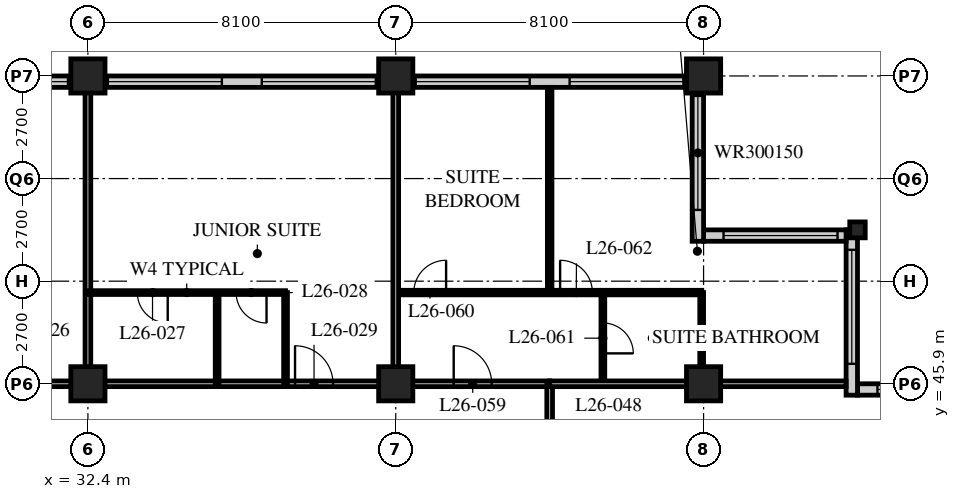
"""IFC4 building model, lengths in metres.
Left out: names, types, materials, properties, quantities, classifications, styles, units other than length and angle.
Written with IfcOpenShell. Run it as: python <this file> out.ifc"""

import sys

from ifc_helpers import new_model, si_unit, direction, frame, frame_2d, origin, origin_2d, place, context, subcontext, project, spatial, rectangle, hollow_rectangle, i_section, extrude, element, fill, save


model = new_model("IFC4")
c1 = context("Model", 3, precision=1e-05, world=origin(), true_north=direction((0.0, 1.0)))
c2 = subcontext(c1, "Body", "Model", "MODEL_VIEW")
j1 = project(units=[si_unit("LENGTHUNIT", "METRE"), si_unit("PLANEANGLEUNIT", "RADIAN")], contexts=[c1])
p1 = place(None, origin())
s1 = spatial("IfcSite", under=j1, at=p1, CompositionType="ELEMENT")
p2 = place(p1, origin())
s2 = spatial("IfcBuilding", under=s1, at=p2, CompositionType="ELEMENT")
p3 = place(p2, frame((0.0, 0.0, 106.8)))
s3 = spatial("IfcBuildingStorey", under=s2, at=p3, CompositionType="ELEMENT", Elevation=106.8)
for number, where, z_axis, x_axis in (
    (1, (32.4, 45.9, 0.0), (0.0, 0.0, 1.0), (1.0, 0.0, 0.0)),
    (2, (32.4, 54.0, 0.0), (0.0, 0.0, 1.0), (1.0, 0.0, 0.0)),
    (3, (40.5, 45.9, 0.0), (0.0, 0.0, 1.0), (1.0, 0.0, 0.0)),
    (4, (40.5, 54.0, 0.0), (0.0, 0.0, 1.0), (1.0, 0.0, 0.0)),
    (5, (48.6, 45.9, 0.0), (0.0, 0.0, 1.0), (1.0, 0.0, 0.0)),
    (6, (48.6, 54.0, 0.0), (0.0, 0.0, 1.0), (1.0, 0.0, 0.0)),
):
    element("IfcColumn", number, at=place(p3, frame(where, z_axis=z_axis, x_axis=x_axis)), inside=s3, PredefinedType="COLUMN", context=c2, shape_type="SweptSolid", body=[
        extrude(hollow_rectangle(XDim=0.9, YDim=0.9, WallThickness=0.09, at=origin_2d()), origin(), (0.0, 0.0, 1.0), 3.4),
    ])
p4 = place(p3, frame((52.65, 49.95, 0.0), z_axis=(0.0, 0.0, 1.0), x_axis=(1.0, 0.0, 0.0)))
e7 = element("IfcColumn", 7, at=p4, inside=s3, PredefinedType="COLUMN", context=c2, shape_type="SweptSolid", body=[
    extrude(i_section(OverallWidth=0.407, OverallDepth=0.419, WebThickness=0.031, FlangeThickness=0.049, FilletRadius=0.015, at=origin_2d()), origin(), (0.0, 0.0, 1.0), 3.4),
])
p5 = place(p3, frame((56.4, 45.75, 0.0), z_axis=(0.0, 0.0, 1.0), x_axis=(-1.0, 0.0, 0.0)))
e8 = element("IfcWall", 8, at=p5, inside=s3, PredefinedType="SOLIDWALL", context=c2, shape_type="SweptSolid", body=[
    extrude(rectangle(XDim=3.75, YDim=0.3, at=frame_2d((1.875, 0.0))), origin(), (0.0, 0.0, 1.0), 3.19),
])
p6 = place(p5, frame((0.225, 0.0, 0.9)))
e9 = element("IfcOpeningElement", 9, at=p6, cuts=e8, PredefinedType="OPENING", context=c2, shape_type="SweptSolid", body=[
    extrude(rectangle(XDim=3.0, YDim=1.5, at=frame_2d((1.5, 0.75))), frame((0.0, 0.16, 0.0), z_axis=(0.0, -1.0, 0.0), x_axis=(1.0, 0.0, 0.0)), (0.0, 0.0, 1.0), 0.32),
])
p7 = place(p3, frame((52.5, 45.6, 0.0), z_axis=(0.0, 0.0, 1.0), x_axis=(0.0, 1.0, 0.0)))
e10 = element("IfcWall", 10, at=p7, inside=s3, PredefinedType="SOLIDWALL", context=c2, shape_type="SweptSolid", body=[
    extrude(rectangle(XDim=4.35, YDim=0.3, at=frame_2d((2.175, 0.0))), origin(), (0.0, 0.0, 1.0), 3.19),
])
p8 = place(p7, frame((0.825, 0.0, 0.9)))
e11 = element("IfcOpeningElement", 11, at=p8, cuts=e10, PredefinedType="OPENING", context=c2, shape_type="SweptSolid", body=[
    extrude(rectangle(XDim=3.0, YDim=1.5, at=frame_2d((1.5, 0.75))), frame((0.0, 0.16, 0.0), z_axis=(0.0, -1.0, 0.0), x_axis=(1.0, 0.0, 0.0)), (0.0, 0.0, 1.0), 0.32),
])
p9 = place(p3, frame((52.35, 49.8, 0.0), z_axis=(0.0, 0.0, 1.0), x_axis=(-1.0, 0.0, 0.0)))
e12 = element("IfcWall", 12, at=p9, inside=s3, PredefinedType="SOLIDWALL", context=c2, shape_type="SweptSolid", body=[
    extrude(rectangle(XDim=3.75, YDim=0.3, at=frame_2d((1.875, 0.0))), origin(), (0.0, 0.0, 1.0), 3.19),
])
p10 = place(p9, frame((0.225, 0.0, 0.9)))
e13 = element("IfcOpeningElement", 13, at=p10, cuts=e12, PredefinedType="OPENING", context=c2, shape_type="SweptSolid", body=[
    extrude(rectangle(XDim=3.0, YDim=1.5, at=frame_2d((1.5, 0.75))), frame((0.0, 0.16, 0.0), z_axis=(0.0, -1.0, 0.0), x_axis=(1.0, 0.0, 0.0)), (0.0, 0.0, 1.0), 0.32),
])
p11 = place(p3, frame((48.45, 49.65, 0.0), z_axis=(0.0, 0.0, 1.0), x_axis=(0.0, 1.0, 0.0)))
e14 = element("IfcWall", 14, at=p11, inside=s3, PredefinedType="SOLIDWALL", context=c2, shape_type="SweptSolid", body=[
    extrude(rectangle(XDim=4.35, YDim=0.3, at=frame_2d((2.175, 0.0))), origin(), (0.0, 0.0, 1.0), 3.19),
])
p12 = place(p11, frame((0.825, 0.0, 0.9)))
e15 = element("IfcOpeningElement", 15, at=p12, cuts=e14, PredefinedType="OPENING", context=c2, shape_type="SweptSolid", body=[
    extrude(rectangle(XDim=3.0, YDim=1.5, at=frame_2d((1.5, 0.75))), frame((0.0, 0.16, 0.0), z_axis=(0.0, -1.0, 0.0), x_axis=(1.0, 0.0, 0.0)), (0.0, 0.0, 1.0), 0.32),
])
p13 = place(p3, frame((48.3, 53.85, 0.0), z_axis=(0.0, 0.0, 1.0), x_axis=(-1.0, 0.0, 0.0)))
e16 = element("IfcWall", 16, at=p13, inside=s3, PredefinedType="SOLIDWALL", context=c2, shape_type="SweptSolid", body=[
    extrude(rectangle(XDim=40.2, YDim=0.3, at=frame_2d((20.1, 0.0))), origin(), (0.0, 0.0, 1.0), 3.19),
])
p14 = place(p13, frame((0.225, 0.0, 0.9)))
e17 = element("IfcOpeningElement", 17, at=p14, cuts=e16, PredefinedType="OPENING", context=c2, shape_type="SweptSolid", body=[
    extrude(rectangle(XDim=3.0, YDim=2.0, at=frame_2d((1.5, 1.0))), frame((0.0, 0.16, 0.0), z_axis=(0.0, -1.0, 0.0), x_axis=(1.0, 0.0, 0.0)), (0.0, 0.0, 1.0), 0.32),
])
p15 = place(p13, frame((4.275, 0.0, 0.9)))
e18 = element("IfcOpeningElement", 18, at=p15, cuts=e16, PredefinedType="OPENING", context=c2, shape_type="SweptSolid", body=[
    extrude(rectangle(XDim=3.0, YDim=2.0, at=frame_2d((1.5, 1.0))), frame((0.0, 0.16, 0.0), z_axis=(0.0, -1.0, 0.0), x_axis=(1.0, 0.0, 0.0)), (0.0, 0.0, 1.0), 0.32),
])
p16 = place(p13, frame((8.325, 0.0, 0.9)))
e19 = element("IfcOpeningElement", 19, at=p16, cuts=e16, PredefinedType="OPENING", context=c2, shape_type="SweptSolid", body=[
    extrude(rectangle(XDim=3.0, YDim=2.0, at=frame_2d((1.5, 1.0))), frame((0.0, 0.16, 0.0), z_axis=(0.0, -1.0, 0.0), x_axis=(1.0, 0.0, 0.0)), (0.0, 0.0, 1.0), 0.32),
])
p17 = place(p13, frame((12.375, 0.0, 0.9)))
e20 = element("IfcOpeningElement", 20, at=p17, cuts=e16, PredefinedType="OPENING", context=c2, shape_type="SweptSolid", body=[
    extrude(rectangle(XDim=3.0, YDim=2.0, at=frame_2d((1.5, 1.0))), frame((0.0, 0.16, 0.0), z_axis=(0.0, -1.0, 0.0), x_axis=(1.0, 0.0, 0.0)), (0.0, 0.0, 1.0), 0.32),
])
p18 = place(p13, frame((16.425, 0.0, 0.9)))
e21 = element("IfcOpeningElement", 21, at=p18, cuts=e16, PredefinedType="OPENING", context=c2, shape_type="SweptSolid", body=[
    extrude(rectangle(XDim=3.0, YDim=2.0, at=frame_2d((1.5, 1.0))), frame((0.0, 0.16, 0.0), z_axis=(0.0, -1.0, 0.0), x_axis=(1.0, 0.0, 0.0)), (0.0, 0.0, 1.0), 0.32),
])
p19 = place(p13, frame((20.475, 0.0, 0.9)))
e22 = element("IfcOpeningElement", 22, at=p19, cuts=e16, PredefinedType="OPENING", context=c2, shape_type="SweptSolid", body=[
    extrude(rectangle(XDim=3.0, YDim=2.0, at=frame_2d((1.5, 1.0))), frame((0.0, 0.16, 0.0), z_axis=(0.0, -1.0, 0.0), x_axis=(1.0, 0.0, 0.0)), (0.0, 0.0, 1.0), 0.32),
])
p20 = place(p13, frame((24.525, 0.0, 0.9)))
e23 = element("IfcOpeningElement", 23, at=p20, cuts=e16, PredefinedType="OPENING", context=c2, shape_type="SweptSolid", body=[
    extrude(rectangle(XDim=3.0, YDim=2.0, at=frame_2d((1.5, 1.0))), frame((0.0, 0.16, 0.0), z_axis=(0.0, -1.0, 0.0), x_axis=(1.0, 0.0, 0.0)), (0.0, 0.0, 1.0), 0.32),
])
p21 = place(p13, frame((28.575, 0.0, 0.9)))
e24 = element("IfcOpeningElement", 24, at=p21, cuts=e16, PredefinedType="OPENING", context=c2, shape_type="SweptSolid", body=[
    extrude(rectangle(XDim=3.0, YDim=2.0, at=frame_2d((1.5, 1.0))), frame((0.0, 0.16, 0.0), z_axis=(0.0, -1.0, 0.0), x_axis=(1.0, 0.0, 0.0)), (0.0, 0.0, 1.0), 0.32),
])
p22 = place(p13, frame((32.625, 0.0, 0.9)))
e25 = element("IfcOpeningElement", 25, at=p22, cuts=e16, PredefinedType="OPENING", context=c2, shape_type="SweptSolid", body=[
    extrude(rectangle(XDim=3.0, YDim=2.0, at=frame_2d((1.5, 1.0))), frame((0.0, 0.16, 0.0), z_axis=(0.0, -1.0, 0.0), x_axis=(1.0, 0.0, 0.0)), (0.0, 0.0, 1.0), 0.32),
])
p23 = place(p13, frame((36.675, 0.0, 0.9)))
e26 = element("IfcOpeningElement", 26, at=p23, cuts=e16, PredefinedType="OPENING", context=c2, shape_type="SweptSolid", body=[
    extrude(rectangle(XDim=3.0, YDim=2.0, at=frame_2d((1.5, 1.0))), frame((0.0, 0.16, 0.0), z_axis=(0.0, -1.0, 0.0), x_axis=(1.0, 0.0, 0.0)), (0.0, 0.0, 1.0), 0.32),
])
p24 = place(p3, frame((12.15, 45.9, 0.0), z_axis=(0.0, 0.0, 1.0), x_axis=(1.0, 0.0, 0.0)))
e27 = element("IfcWall", 27, at=p24, inside=s3, PredefinedType="PARTITIONING", context=c2, shape_type="SweptSolid", body=[
    extrude(rectangle(XDim=32.4, YDim=0.15, at=frame_2d((16.2, 0.0))), origin(), (0.0, 0.0, 1.0), 2.578),
])
p25 = place(p24, frame((9.5, 0.0, 0.0)))
e28 = element("IfcOpeningElement", 28, at=p25, cuts=e27, PredefinedType="OPENING", context=c2, shape_type="SweptSolid", body=[
    extrude(rectangle(XDim=1.0, YDim=2.1, at=frame_2d((0.5, 1.05))), frame((0.0, 0.085, 0.0), z_axis=(0.0, -1.0, 0.0), x_axis=(1.0, 0.0, 0.0)), (0.0, 0.0, 1.0), 0.17),
])
p26 = place(p24, frame((17.6, 0.0, 0.0)))
e29 = element("IfcOpeningElement", 29, at=p26, cuts=e27, PredefinedType="OPENING", context=c2, shape_type="SweptSolid", body=[
    extrude(rectangle(XDim=1.0, YDim=2.1, at=frame_2d((0.5, 1.05))), frame((0.0, 0.085, 0.0), z_axis=(0.0, -1.0, 0.0), x_axis=(1.0, 0.0, 0.0)), (0.0, 0.0, 1.0), 0.17),
])
p27 = place(p24, frame((25.7, 0.0, 0.0)))
e30 = element("IfcOpeningElement", 30, at=p27, cuts=e27, PredefinedType="OPENING", context=c2, shape_type="SweptSolid", body=[
    extrude(rectangle(XDim=1.0, YDim=2.1, at=frame_2d((0.5, 1.05))), frame((0.0, 0.085, 0.0), z_axis=(0.0, -1.0, 0.0), x_axis=(1.0, 0.0, 0.0)), (0.0, 0.0, 1.0), 0.17),
])
p28 = place(p24, frame((29.875, 0.0, 0.0)))
e31 = element("IfcOpeningElement", 31, at=p28, cuts=e27, PredefinedType="OPENING", context=c2, shape_type="SweptSolid", body=[
    extrude(rectangle(XDim=1.0, YDim=2.1, at=frame_2d((0.5, 1.05))), frame((0.0, 0.085, 0.0), z_axis=(0.0, -1.0, 0.0), x_axis=(1.0, 0.0, 0.0)), (0.0, 0.0, 1.0), 0.17),
])
p29 = place(p24, frame((1.525, 0.0, 0.0)))
e32 = element("IfcOpeningElement", 32, at=p29, cuts=e27, PredefinedType="OPENING", context=c2, shape_type="SweptSolid", body=[
    extrude(rectangle(XDim=1.0, YDim=2.1, at=frame_2d((0.5, 1.05))), frame((0.0, 0.085, 0.0), z_axis=(0.0, -1.0, 0.0), x_axis=(1.0, 0.0, 0.0)), (0.0, 0.0, 1.0), 0.17),
])
p30 = place(p3, frame((44.55, 21.6, 0.0), z_axis=(0.0, 0.0, 1.0), x_axis=(0.0, 1.0, 0.0)))
e33 = element("IfcWall", 33, at=p30, inside=s3, PredefinedType="PARTITIONING", context=c2, shape_type="SweptSolid", body=[
    extrude(rectangle(XDim=24.3, YDim=0.15, at=frame_2d((12.15, 0.0))), origin(), (0.0, 0.0, 1.0), 3.19),
])
p31 = place(p30, frame((2.75, 0.0, 0.0)))
e34 = element("IfcOpeningElement", 34, at=p31, cuts=e33, PredefinedType="OPENING", context=c2, shape_type="SweptSolid", body=[
    extrude(rectangle(XDim=1.0, YDim=2.1, at=frame_2d((0.5, 1.05))), frame((0.0, 0.085, 0.0), z_axis=(0.0, -1.0, 0.0), x_axis=(1.0, 0.0, 0.0)), (0.0, 0.0, 1.0), 0.17),
])
p32 = place(p30, frame((6.5, 0.0, 0.0)))
e35 = element("IfcOpeningElement", 35, at=p32, cuts=e33, PredefinedType="OPENING", context=c2, shape_type="SweptSolid", body=[
    extrude(rectangle(XDim=1.0, YDim=2.1, at=frame_2d((0.5, 1.05))), frame((0.0, 0.085, 0.0), z_axis=(0.0, -1.0, 0.0), x_axis=(1.0, 0.0, 0.0)), (0.0, 0.0, 1.0), 0.17),
])
p33 = place(p30, frame((13.55, 0.0, 0.0)))
e36 = element("IfcOpeningElement", 36, at=p33, cuts=e33, PredefinedType="OPENING", context=c2, shape_type="SweptSolid", body=[
    extrude(rectangle(XDim=1.0, YDim=2.1, at=frame_2d((0.5, 1.05))), frame((0.0, 0.085, 0.0), z_axis=(0.0, -1.0, 0.0), x_axis=(1.0, 0.0, 0.0)), (0.0, 0.0, 1.0), 0.17),
])
p34 = place(p30, frame((21.65, 0.0, 0.0)))
e37 = element("IfcOpeningElement", 37, at=p34, cuts=e33, PredefinedType="OPENING", context=c2, shape_type="SweptSolid", body=[
    extrude(rectangle(XDim=1.0, YDim=2.1, at=frame_2d((0.5, 1.05))), frame((0.0, 0.085, 0.0), z_axis=(0.0, -1.0, 0.0), x_axis=(1.0, 0.0, 0.0)), (0.0, 0.0, 1.0), 0.17),
])
p35 = place(p3, frame((32.4, 45.9, 0.0), z_axis=(0.0, 0.0, 1.0), x_axis=(0.0, 1.0, 0.0)))
e38 = element("IfcWall", 38, at=p35, inside=s3, PredefinedType="PARTITIONING", context=c2, shape_type="SweptSolid", body=[
    extrude(rectangle(XDim=7.8, YDim=0.15, at=frame_2d((3.9, 0.0))), origin(), (0.0, 0.0, 1.0), 2.578),
])
p36 = place(p3, frame((32.4, 48.3, 0.0), z_axis=(0.0, 0.0, 1.0), x_axis=(1.0, 0.0, 0.0)))
e39 = element("IfcWall", 39, at=p36, inside=s3, PredefinedType="PARTITIONING", context=c2, shape_type="SweptSolid", body=[
    extrude(rectangle(XDim=5.2, YDim=0.1, at=frame_2d((2.6, 0.0))), origin(), (0.0, 0.0, 1.0), 3.19),
])
p37 = place(p36, frame((1.3, 0.0, 0.0)))
e40 = element("IfcOpeningElement", 40, at=p37, cuts=e39, PredefinedType="OPENING", context=c2, shape_type="SweptSolid", body=[
    extrude(rectangle(XDim=0.8, YDim=2.1, at=frame_2d((0.4, 1.05))), frame((0.0, 0.06, 0.0), z_axis=(0.0, -1.0, 0.0), x_axis=(1.0, 0.0, 0.0)), (0.0, 0.0, 1.0), 0.12),
])
p38 = place(p36, frame((3.9, 0.0, 0.0)))
e41 = element("IfcOpeningElement", 41, at=p38, cuts=e39, PredefinedType="OPENING", context=c2, shape_type="SweptSolid", body=[
    extrude(rectangle(XDim=0.8, YDim=2.1, at=frame_2d((0.4, 1.05))), frame((0.0, 0.06, 0.0), z_axis=(0.0, -1.0, 0.0), x_axis=(1.0, 0.0, 0.0)), (0.0, 0.0, 1.0), 0.12),
])
for number, where, z_axis, x_axis in (
    (42, (35.8, 45.9, 0.0), (0.0, 0.0, 1.0), (0.0, 1.0, 0.0)),
    (43, (37.6, 45.9, 0.0), (0.0, 0.0, 1.0), (0.0, 1.0, 0.0)),
):
    element("IfcWall", number, at=place(p3, frame(where, z_axis=z_axis, x_axis=x_axis)), inside=s3, PredefinedType="PARTITIONING", context=c2, shape_type="SweptSolid", body=[
        extrude(rectangle(XDim=2.4, YDim=0.1, at=frame_2d((1.2, 0.0))), origin(), (0.0, 0.0, 1.0), 3.19),
    ])
p39 = place(p3, frame((40.5, 48.3, 0.0), z_axis=(0.0, 0.0, 1.0), x_axis=(1.0, 0.0, 0.0)))
e44 = element("IfcWall", 44, at=p39, inside=s3, PredefinedType="PARTITIONING", context=c2, shape_type="SweptSolid", body=[
    extrude(rectangle(XDim=8.05, YDim=0.12, at=frame_2d((4.025, 0.0))), origin(), (0.0, 0.0, 1.0), 3.19),
])
p40 = place(p39, frame((0.475, 0.0, 0.0)))
e45 = element("IfcOpeningElement", 45, at=p40, cuts=e44, PredefinedType="OPENING", context=c2, shape_type="SweptSolid", body=[
    extrude(rectangle(XDim=0.85, YDim=2.1, at=frame_2d((0.425, 1.05))), frame((0.0, 0.07, 0.0), z_axis=(0.0, -1.0, 0.0), x_axis=(1.0, 0.0, 0.0)), (0.0, 0.0, 1.0), 0.14),
])
p41 = place(p39, frame((4.325, 0.0, 0.0)))
e46 = element("IfcOpeningElement", 46, at=p41, cuts=e44, PredefinedType="OPENING", context=c2, shape_type="SweptSolid", body=[
    extrude(rectangle(XDim=0.85, YDim=2.1, at=frame_2d((0.425, 1.05))), frame((0.0, 0.07, 0.0), z_axis=(0.0, -1.0, 0.0), x_axis=(1.0, 0.0, 0.0)), (0.0, 0.0, 1.0), 0.14),
])
p42 = place(p3, frame((45.95, 45.9, 0.0), z_axis=(0.0, 0.0, 1.0), x_axis=(0.0, 1.0, 0.0)))
e47 = element("IfcWall", 47, at=p42, inside=s3, PredefinedType="PARTITIONING", context=c2, shape_type="SweptSolid", body=[
    extrude(rectangle(XDim=2.4, YDim=0.1, at=frame_2d((1.2, 0.0))), origin(), (0.0, 0.0, 1.0), 3.19),
])
p43 = place(p42, frame((0.8, 0.0, 0.0)))
e48 = element("IfcOpeningElement", 48, at=p43, cuts=e47, PredefinedType="OPENING", context=c2, shape_type="SweptSolid", body=[
    extrude(rectangle(XDim=0.8, YDim=2.1, at=frame_2d((0.4, 1.05))), frame((0.0, 0.06, 0.0), z_axis=(0.0, -1.0, 0.0), x_axis=(1.0, 0.0, 0.0)), (0.0, 0.0, 1.0), 0.12),
])
p44 = place(p3, frame((48.55, 45.9, 0.0), z_axis=(0.0, 0.0, 1.0), x_axis=(0.0, 1.0, 0.0)))
e49 = element("IfcWall", 49, at=p44, inside=s3, PredefinedType="PARTITIONING", context=c2, shape_type="SweptSolid", body=[
    extrude(rectangle(XDim=2.4, YDim=0.1, at=frame_2d((1.2, 0.0))), origin(), (0.0, 0.0, 1.0), 2.578),
])
p45 = place(p3, frame((44.55, 48.3, 0.0), z_axis=(0.0, 0.0, 1.0), x_axis=(0.0, 1.0, 0.0)))
e50 = element("IfcWall", 50, at=p45, inside=s3, PredefinedType="PARTITIONING", context=c2, shape_type="SweptSolid", body=[
    extrude(rectangle(XDim=5.4, YDim=0.12, at=frame_2d((2.7, 0.0))), origin(), (0.0, 0.0, 1.0), 3.19),
])
for number, where, z_axis, x_axis in (
    (51, (44.55, 45.9, 0.0), (0.0, 0.0, 1.0), (1.0, 0.0, 0.0)),
    (52, (40.5, 45.9, 0.0), (0.0, 0.0, 1.0), (0.0, 1.0, 0.0)),
):
    element("IfcWall", number, at=place(p3, frame(where, z_axis=z_axis, x_axis=x_axis)), inside=s3, PredefinedType="PARTITIONING", context=c2, shape_type="SweptSolid", body=[
        extrude(rectangle(XDim=7.8, YDim=0.15, at=frame_2d((3.9, 0.0))), origin(), (0.0, 0.0, 1.0), 2.578),
    ])
p46 = place(p6, origin())
e53 = element("IfcWindow", 53, at=p46, inside=s3, PartitioningType="SINGLE_PANEL", PredefinedType="WINDOW", context=c2, shape_type="SweptSolid", body=[
    extrude(rectangle(XDim=3.0, YDim=1.5, at=frame_2d((1.5, 0.75))), frame((0.0, 0.03, 0.0), z_axis=(0.0, -1.0, 0.0), x_axis=(1.0, 0.0, 0.0)), (0.0, 0.0, 1.0), 0.06),
])
fill(e9, e53)
p47 = place(p8, origin())
e54 = element("IfcWindow", 54, at=p47, inside=s3, PartitioningType="SINGLE_PANEL", PredefinedType="WINDOW", context=c2, shape_type="SweptSolid", body=[
    extrude(rectangle(XDim=3.0, YDim=1.5, at=frame_2d((1.5, 0.75))), frame((0.0, 0.03, 0.0), z_axis=(0.0, -1.0, 0.0), x_axis=(1.0, 0.0, 0.0)), (0.0, 0.0, 1.0), 0.06),
])
fill(e11, e54)
p48 = place(p10, origin())
e55 = element("IfcWindow", 55, at=p48, inside=s3, PartitioningType="SINGLE_PANEL", PredefinedType="WINDOW", context=c2, shape_type="SweptSolid", body=[
    extrude(rectangle(XDim=3.0, YDim=1.5, at=frame_2d((1.5, 0.75))), frame((0.0, 0.03, 0.0), z_axis=(0.0, -1.0, 0.0), x_axis=(1.0, 0.0, 0.0)), (0.0, 0.0, 1.0), 0.06),
])
fill(e13, e55)
p49 = place(p12, origin())
e56 = element("IfcWindow", 56, at=p49, inside=s3, PartitioningType="SINGLE_PANEL", PredefinedType="WINDOW", context=c2, shape_type="SweptSolid", body=[
    extrude(rectangle(XDim=3.0, YDim=1.5, at=frame_2d((1.5, 0.75))), frame((0.0, 0.03, 0.0), z_axis=(0.0, -1.0, 0.0), x_axis=(1.0, 0.0, 0.0)), (0.0, 0.0, 1.0), 0.06),
])
fill(e15, e56)
p50 = place(p14, origin())
e57 = element("IfcWindow", 57, at=p50, inside=s3, PartitioningType="SINGLE_PANEL", PredefinedType="WINDOW", context=c2, shape_type="SweptSolid", body=[
    extrude(rectangle(XDim=3.0, YDim=2.0, at=frame_2d((1.5, 1.0))), frame((0.0, 0.03, 0.0), z_axis=(0.0, -1.0, 0.0), x_axis=(1.0, 0.0, 0.0)), (0.0, 0.0, 1.0), 0.06),
])
fill(e17, e57)
p51 = place(p15, origin())
e58 = element("IfcWindow", 58, at=p51, inside=s3, PartitioningType="SINGLE_PANEL", PredefinedType="WINDOW", context=c2, shape_type="SweptSolid", body=[
    extrude(rectangle(XDim=3.0, YDim=2.0, at=frame_2d((1.5, 1.0))), frame((0.0, 0.03, 0.0), z_axis=(0.0, -1.0, 0.0), x_axis=(1.0, 0.0, 0.0)), (0.0, 0.0, 1.0), 0.06),
])
fill(e18, e58)
p52 = place(p16, origin())
e59 = element("IfcWindow", 59, at=p52, inside=s3, PartitioningType="SINGLE_PANEL", PredefinedType="WINDOW", context=c2, shape_type="SweptSolid", body=[
    extrude(rectangle(XDim=3.0, YDim=2.0, at=frame_2d((1.5, 1.0))), frame((0.0, 0.03, 0.0), z_axis=(0.0, -1.0, 0.0), x_axis=(1.0, 0.0, 0.0)), (0.0, 0.0, 1.0), 0.06),
])
fill(e19, e59)
p53 = place(p17, origin())
e60 = element("IfcWindow", 60, at=p53, inside=s3, PartitioningType="SINGLE_PANEL", PredefinedType="WINDOW", context=c2, shape_type="SweptSolid", body=[
    extrude(rectangle(XDim=3.0, YDim=2.0, at=frame_2d((1.5, 1.0))), frame((0.0, 0.03, 0.0), z_axis=(0.0, -1.0, 0.0), x_axis=(1.0, 0.0, 0.0)), (0.0, 0.0, 1.0), 0.06),
])
fill(e20, e60)
p54 = place(p18, origin())
e61 = element("IfcWindow", 61, at=p54, inside=s3, PartitioningType="SINGLE_PANEL", PredefinedType="WINDOW", context=c2, shape_type="SweptSolid", body=[
    extrude(rectangle(XDim=3.0, YDim=2.0, at=frame_2d((1.5, 1.0))), frame((0.0, 0.03, 0.0), z_axis=(0.0, -1.0, 0.0), x_axis=(1.0, 0.0, 0.0)), (0.0, 0.0, 1.0), 0.06),
])
fill(e21, e61)
p55 = place(p37, origin())
e62 = element("IfcDoor", 62, at=p55, inside=s3, OperationType="SINGLE_SWING_LEFT", PredefinedType="DOOR", context=c2, shape_type="SweptSolid", body=[
    extrude(rectangle(XDim=0.8, YDim=2.1, at=frame_2d((0.4, 1.05))), frame((0.0, 0.025, 0.0), z_axis=(0.0, -1.0, 0.0), x_axis=(1.0, 0.0, 0.0)), (0.0, 0.0, 1.0), 0.05),
])
fill(e40, e62)
p56 = place(p38, origin())
e63 = element("IfcDoor", 63, at=p56, inside=s3, OperationType="SINGLE_SWING_LEFT", PredefinedType="DOOR", context=c2, shape_type="SweptSolid", body=[
    extrude(rectangle(XDim=0.8, YDim=2.1, at=frame_2d((0.4, 1.05))), frame((0.0, 0.025, 0.0), z_axis=(0.0, -1.0, 0.0), x_axis=(1.0, 0.0, 0.0)), (0.0, 0.0, 1.0), 0.05),
])
fill(e41, e63)
p57 = place(p27, origin())
e64 = element("IfcDoor", 64, at=p57, inside=s3, OperationType="SINGLE_SWING_LEFT", PredefinedType="DOOR", context=c2, shape_type="SweptSolid", body=[
    extrude(rectangle(XDim=1.0, YDim=2.1, at=frame_2d((0.5, 1.05))), frame((0.0, 0.025, 0.0), z_axis=(0.0, -1.0, 0.0), x_axis=(1.0, 0.0, 0.0)), (0.0, 0.0, 1.0), 0.05),
])
fill(e30, e64)
p58 = place(p28, origin())
e65 = element("IfcDoor", 65, at=p58, inside=s3, OperationType="SINGLE_SWING_LEFT", PredefinedType="DOOR", context=c2, shape_type="SweptSolid", body=[
    extrude(rectangle(XDim=1.0, YDim=2.1, at=frame_2d((0.5, 1.05))), frame((0.0, 0.025, 0.0), z_axis=(0.0, -1.0, 0.0), x_axis=(1.0, 0.0, 0.0)), (0.0, 0.0, 1.0), 0.05),
])
fill(e31, e65)
p59 = place(p40, origin())
e66 = element("IfcDoor", 66, at=p59, inside=s3, OperationType="SINGLE_SWING_RIGHT", PredefinedType="DOOR", context=c2, shape_type="SweptSolid", body=[
    extrude(rectangle(XDim=0.85, YDim=2.1, at=frame_2d((0.425, 1.05))), frame((0.0, 0.025, 0.0), z_axis=(0.0, -1.0, 0.0), x_axis=(1.0, 0.0, 0.0)), (0.0, 0.0, 1.0), 0.05),
])
fill(e45, e66)
p60 = place(p43, origin())
e67 = element("IfcDoor", 67, at=p60, inside=s3, OperationType="SINGLE_SWING_RIGHT", PredefinedType="DOOR", context=c2, shape_type="SweptSolid", body=[
    extrude(rectangle(XDim=0.8, YDim=2.1, at=frame_2d((0.4, 1.05))), frame((0.0, 0.025, 0.0), z_axis=(0.0, -1.0, 0.0), x_axis=(1.0, 0.0, 0.0)), (0.0, 0.0, 1.0), 0.05),
])
fill(e48, e67)
p61 = place(p41, origin())
e68 = element("IfcDoor", 68, at=p61, inside=s3, OperationType="SINGLE_SWING_LEFT", PredefinedType="DOOR", context=c2, shape_type="SweptSolid", body=[
    extrude(rectangle(XDim=0.85, YDim=2.1, at=frame_2d((0.425, 1.05))), frame((0.0, 0.025, 0.0), z_axis=(0.0, -1.0, 0.0), x_axis=(1.0, 0.0, 0.0)), (0.0, 0.0, 1.0), 0.05),
])
fill(e46, e68)
save(model, sys.argv[1])
